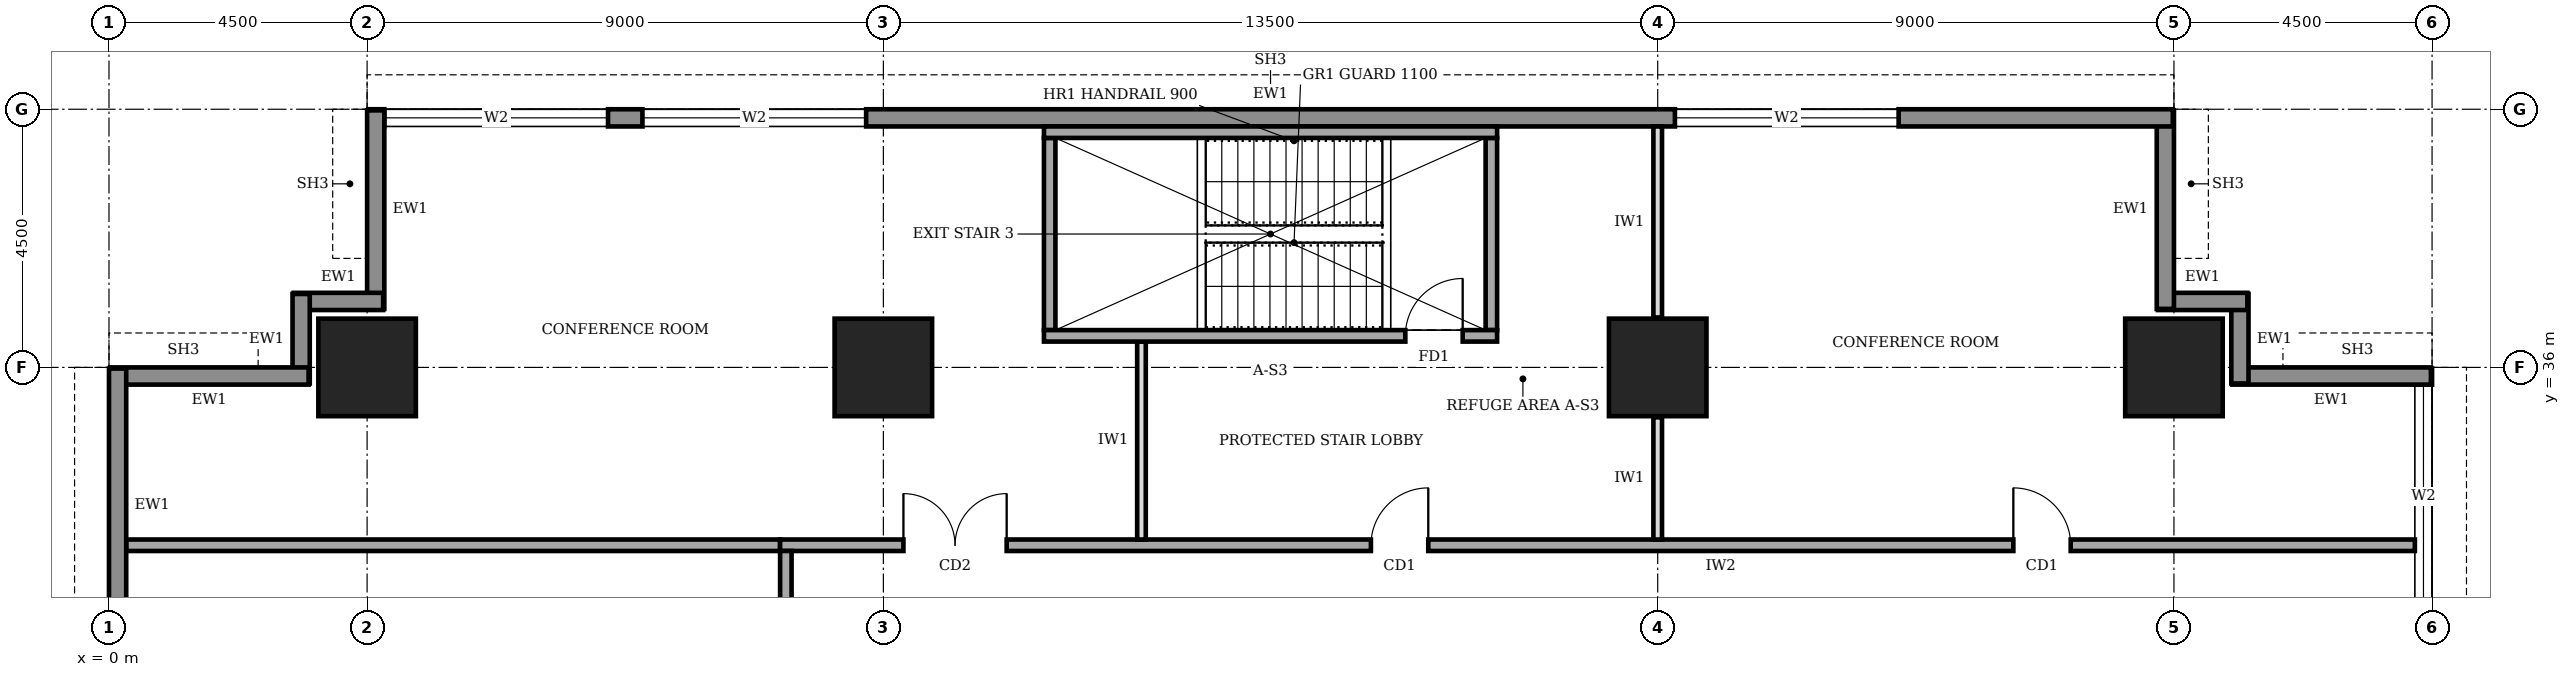
"""IFC4 building model, lengths in metres.
Left out: names, types, materials, properties, quantities, classifications, styles, units other than length and angle.
Written with IfcOpenShell. Run it as: python <this file> out.ifc"""

import sys

from ifc_helpers import new_model, si_unit, direction, frame, frame_2d, origin, origin_2d, place, context, subcontext, project, spatial, rectangle, extrude, element, fill, save


model = new_model("IFC4")
c1 = context("Model", 3, precision=1e-05, world=origin(), true_north=direction((0.0, 1.0)))
c2 = subcontext(c1, "Body", "Model", "MODEL_VIEW")
j1 = project(units=[si_unit("LENGTHUNIT", "METRE"), si_unit("PLANEANGLEUNIT", "RADIAN")], contexts=[c1])
p1 = place(None, origin())
s1 = spatial("IfcSite", under=j1, at=p1, CompositionType="ELEMENT")
p2 = place(p1, origin())
s2 = spatial("IfcBuilding", under=s1, at=p2, CompositionType="ELEMENT")
p3 = place(p2, frame((0.0, 0.0, 149.0)))
s3 = spatial("IfcBuildingStorey", under=s2, at=p3, CompositionType="ELEMENT", Elevation=149.0)
for number, where, z_axis, x_axis in (
    (1, (4.5, 36.0, 0.0), (0.0, 0.0, 1.0), (1.0, 0.0, 0.0)),
    (2, (13.5, 36.0, 0.0), (0.0, 0.0, 1.0), (1.0, 0.0, 0.0)),
    (3, (27.0, 36.0, 0.0), (0.0, 0.0, 1.0), (1.0, 0.0, 0.0)),
    (4, (36.0, 36.0, 0.0), (0.0, 0.0, 1.0), (1.0, 0.0, 0.0)),
):
    element("IfcColumn", number, at=place(p3, frame(where, z_axis=z_axis, x_axis=x_axis)), inside=s3, PredefinedType="COLUMN", context=c2, shape_type="SweptSolid", body=[
        extrude(rectangle(XDim=1.7, YDim=1.7, at=origin_2d()), origin(), (0.0, 0.0, 1.0), 4.0),
    ])
p4 = place(p3, frame((40.35, 4.52, 0.0), z_axis=(0.0, 0.0, 1.0), x_axis=(0.0, 1.0, 0.0)))
e5 = element("IfcWall", 5, at=p4, inside=s3, PredefinedType="STANDARD", context=c2, shape_type="SweptSolid", body=[
    extrude(rectangle(XDim=31.46, YDim=0.3, at=frame_2d((15.73, 0.0))), origin(), (0.0, 0.0, 1.0), 3.75),
])
p5 = place(p4, frame((4.78, 0.0, 0.6)))
e6 = element("IfcOpeningElement", 6, at=p5, cuts=e5, PredefinedType="OPENING", context=c2, shape_type="SweptSolid", body=[
    extrude(rectangle(XDim=3.9, YDim=2.6, at=frame_2d((1.95, 1.3))), frame((0.0, 0.16, 0.0), z_axis=(0.0, -1.0, 0.0), x_axis=(1.0, 0.0, 0.0)), (0.0, 0.0, 1.0), 0.32),
])
p6 = place(p4, frame((9.28, 0.0, 0.6)))
e7 = element("IfcOpeningElement", 7, at=p6, cuts=e5, PredefinedType="OPENING", context=c2, shape_type="SweptSolid", body=[
    extrude(rectangle(XDim=3.9, YDim=2.6, at=frame_2d((1.95, 1.3))), frame((0.0, 0.16, 0.0), z_axis=(0.0, -1.0, 0.0), x_axis=(1.0, 0.0, 0.0)), (0.0, 0.0, 1.0), 0.32),
])
p7 = place(p4, frame((13.78, 0.0, 0.6)))
e8 = element("IfcOpeningElement", 8, at=p7, cuts=e5, PredefinedType="OPENING", context=c2, shape_type="SweptSolid", body=[
    extrude(rectangle(XDim=3.9, YDim=2.6, at=frame_2d((1.95, 1.3))), frame((0.0, 0.16, 0.0), z_axis=(0.0, -1.0, 0.0), x_axis=(1.0, 0.0, 0.0)), (0.0, 0.0, 1.0), 0.32),
])
p8 = place(p4, frame((18.28, 0.0, 0.6)))
e9 = element("IfcOpeningElement", 9, at=p8, cuts=e5, PredefinedType="OPENING", context=c2, shape_type="SweptSolid", body=[
    extrude(rectangle(XDim=3.9, YDim=2.6, at=frame_2d((1.95, 1.3))), frame((0.0, 0.16, 0.0), z_axis=(0.0, -1.0, 0.0), x_axis=(1.0, 0.0, 0.0)), (0.0, 0.0, 1.0), 0.32),
])
p9 = place(p4, frame((22.78, 0.0, 0.6)))
e10 = element("IfcOpeningElement", 10, at=p9, cuts=e5, PredefinedType="OPENING", context=c2, shape_type="SweptSolid", body=[
    extrude(rectangle(XDim=3.9, YDim=2.6, at=frame_2d((1.95, 1.3))), frame((0.0, 0.16, 0.0), z_axis=(0.0, -1.0, 0.0), x_axis=(1.0, 0.0, 0.0)), (0.0, 0.0, 1.0), 0.32),
])
p10 = place(p4, frame((27.28, 0.0, 0.6)))
e11 = element("IfcOpeningElement", 11, at=p10, cuts=e5, PredefinedType="OPENING", context=c2, shape_type="SweptSolid", body=[
    extrude(rectangle(XDim=3.9, YDim=2.6, at=frame_2d((1.95, 1.3))), frame((0.0, 0.16, 0.0), z_axis=(0.0, -1.0, 0.0), x_axis=(1.0, 0.0, 0.0)), (0.0, 0.0, 1.0), 0.32),
])
p11 = place(p3, frame((40.48, 35.85, 0.0), z_axis=(0.0, 0.0, 1.0), x_axis=(-1.0, 0.0, 0.0)))
e12 = element("IfcWall", 12, at=p11, inside=s3, PredefinedType="STANDARD", context=c2, shape_type="SweptSolid", body=[
    extrude(rectangle(XDim=3.46, YDim=0.3, at=frame_2d((1.73, 0.0))), origin(), (0.0, 0.0, 1.0), 2.85),
])
for number, where, z_axis, x_axis in (
    (13, (37.15, 35.72, 0.0), (0.0, 0.0, 1.0), (0.0, 1.0, 0.0)),
    (14, (37.28, 37.15, 0.0), (0.0, 0.0, 1.0), (-1.0, 0.0, 0.0)),
):
    element("IfcWall", number, at=place(p3, frame(where, z_axis=z_axis, x_axis=x_axis)), inside=s3, PredefinedType="STANDARD", context=c2, shape_type="SweptSolid", body=[
        extrude(rectangle(XDim=1.56, YDim=0.3, at=frame_2d((0.78, 0.0))), origin(), (0.0, 0.0, 1.0), 3.75),
    ])
p12 = place(p3, frame((35.85, 37.02, 0.0), z_axis=(0.0, 0.0, 1.0), x_axis=(0.0, 1.0, 0.0)))
e15 = element("IfcWall", 15, at=p12, inside=s3, PredefinedType="STANDARD", context=c2, shape_type="SweptSolid", body=[
    extrude(rectangle(XDim=3.46, YDim=0.3, at=frame_2d((1.73, 0.0))), origin(), (0.0, 0.0, 1.0), 2.85),
])
p13 = place(p3, frame((35.98, 40.35, 0.0), z_axis=(0.0, 0.0, 1.0), x_axis=(-1.0, 0.0, 0.0)))
e16 = element("IfcWall", 16, at=p13, inside=s3, PredefinedType="STANDARD", context=c2, shape_type="SweptSolid", body=[
    extrude(rectangle(XDim=31.46, YDim=0.3, at=frame_2d((15.73, 0.0))), origin(), (0.0, 0.0, 1.0), 3.75),
])
p14 = place(p13, frame((27.28, 0.0, 0.6)))
e17 = element("IfcOpeningElement", 17, at=p14, cuts=e16, PredefinedType="OPENING", context=c2, shape_type="SweptSolid", body=[
    extrude(rectangle(XDim=3.9, YDim=2.6, at=frame_2d((1.95, 1.3))), frame((0.0, 0.16, 0.0), z_axis=(0.0, -1.0, 0.0), x_axis=(1.0, 0.0, 0.0)), (0.0, 0.0, 1.0), 0.32),
])
p15 = place(p13, frame((22.78, 0.0, 0.6)))
e18 = element("IfcOpeningElement", 18, at=p15, cuts=e16, PredefinedType="OPENING", context=c2, shape_type="SweptSolid", body=[
    extrude(rectangle(XDim=3.9, YDim=2.6, at=frame_2d((1.95, 1.3))), frame((0.0, 0.16, 0.0), z_axis=(0.0, -1.0, 0.0), x_axis=(1.0, 0.0, 0.0)), (0.0, 0.0, 1.0), 0.32),
])
p16 = place(p13, frame((4.78, 0.0, 0.6)))
e19 = element("IfcOpeningElement", 19, at=p16, cuts=e16, PredefinedType="OPENING", context=c2, shape_type="SweptSolid", body=[
    extrude(rectangle(XDim=3.9, YDim=2.6, at=frame_2d((1.95, 1.3))), frame((0.0, 0.16, 0.0), z_axis=(0.0, -1.0, 0.0), x_axis=(1.0, 0.0, 0.0)), (0.0, 0.0, 1.0), 0.32),
])
p17 = place(p3, frame((4.65, 40.48, 0.0), z_axis=(0.0, 0.0, 1.0), x_axis=(0.0, -1.0, 0.0)))
e20 = element("IfcWall", 20, at=p17, inside=s3, PredefinedType="STANDARD", context=c2, shape_type="SweptSolid", body=[
    extrude(rectangle(XDim=3.46, YDim=0.3, at=frame_2d((1.73, 0.0))), origin(), (0.0, 0.0, 1.0), 2.85),
])
for number, where, z_axis, x_axis in (
    (21, (4.78, 37.15, 0.0), (0.0, 0.0, 1.0), (-1.0, 0.0, 0.0)),
    (22, (3.35, 37.28, 0.0), (0.0, 0.0, 1.0), (0.0, -1.0, 0.0)),
):
    element("IfcWall", number, at=place(p3, frame(where, z_axis=z_axis, x_axis=x_axis)), inside=s3, PredefinedType="STANDARD", context=c2, shape_type="SweptSolid", body=[
        extrude(rectangle(XDim=1.56, YDim=0.3, at=frame_2d((0.78, 0.0))), origin(), (0.0, 0.0, 1.0), 3.75),
    ])
p18 = place(p3, frame((3.48, 35.85, 0.0), z_axis=(0.0, 0.0, 1.0), x_axis=(-1.0, 0.0, 0.0)))
e23 = element("IfcWall", 23, at=p18, inside=s3, PredefinedType="STANDARD", context=c2, shape_type="SweptSolid", body=[
    extrude(rectangle(XDim=3.46, YDim=0.3, at=frame_2d((1.73, 0.0))), origin(), (0.0, 0.0, 1.0), 2.85),
])
p19 = place(p3, frame((0.15, 35.98, 0.0), z_axis=(0.0, 0.0, 1.0), x_axis=(0.0, -1.0, 0.0)))
e24 = element("IfcWall", 24, at=p19, inside=s3, PredefinedType="STANDARD", context=c2, shape_type="SweptSolid", body=[
    extrude(rectangle(XDim=31.46, YDim=0.3, at=frame_2d((15.73, 0.0))), origin(), (0.0, 0.0, 1.0), 3.75),
])
p20 = place(p19, frame((27.28, 0.0, 0.6)))
e25 = element("IfcOpeningElement", 25, at=p20, cuts=e24, PredefinedType="OPENING", context=c2, shape_type="SweptSolid", body=[
    extrude(rectangle(XDim=3.9, YDim=2.6, at=frame_2d((1.95, 1.3))), frame((0.0, 0.16, 0.0), z_axis=(0.0, -1.0, 0.0), x_axis=(1.0, 0.0, 0.0)), (0.0, 0.0, 1.0), 0.32),
])
p21 = place(p19, frame((22.78, 0.0, 0.6)))
e26 = element("IfcOpeningElement", 26, at=p21, cuts=e24, PredefinedType="OPENING", context=c2, shape_type="SweptSolid", body=[
    extrude(rectangle(XDim=3.9, YDim=2.6, at=frame_2d((1.95, 1.3))), frame((0.0, 0.16, 0.0), z_axis=(0.0, -1.0, 0.0), x_axis=(1.0, 0.0, 0.0)), (0.0, 0.0, 1.0), 0.32),
])
p22 = place(p19, frame((18.28, 0.0, 0.6)))
e27 = element("IfcOpeningElement", 27, at=p22, cuts=e24, PredefinedType="OPENING", context=c2, shape_type="SweptSolid", body=[
    extrude(rectangle(XDim=3.9, YDim=2.6, at=frame_2d((1.95, 1.3))), frame((0.0, 0.16, 0.0), z_axis=(0.0, -1.0, 0.0), x_axis=(1.0, 0.0, 0.0)), (0.0, 0.0, 1.0), 0.32),
])
p23 = place(p19, frame((13.78, 0.0, 0.6)))
e28 = element("IfcOpeningElement", 28, at=p23, cuts=e24, PredefinedType="OPENING", context=c2, shape_type="SweptSolid", body=[
    extrude(rectangle(XDim=3.9, YDim=2.6, at=frame_2d((1.95, 1.3))), frame((0.0, 0.16, 0.0), z_axis=(0.0, -1.0, 0.0), x_axis=(1.0, 0.0, 0.0)), (0.0, 0.0, 1.0), 0.32),
])
p24 = place(p19, frame((9.28, 0.0, 0.6)))
e29 = element("IfcOpeningElement", 29, at=p24, cuts=e24, PredefinedType="OPENING", context=c2, shape_type="SweptSolid", body=[
    extrude(rectangle(XDim=3.9, YDim=2.6, at=frame_2d((1.95, 1.3))), frame((0.0, 0.16, 0.0), z_axis=(0.0, -1.0, 0.0), x_axis=(1.0, 0.0, 0.0)), (0.0, 0.0, 1.0), 0.32),
])
p25 = place(p19, frame((4.78, 0.0, 0.6)))
e30 = element("IfcOpeningElement", 30, at=p25, cuts=e24, PredefinedType="OPENING", context=c2, shape_type="SweptSolid", body=[
    extrude(rectangle(XDim=3.9, YDim=2.6, at=frame_2d((1.95, 1.3))), frame((0.0, 0.16, 0.0), z_axis=(0.0, -1.0, 0.0), x_axis=(1.0, 0.0, 0.0)), (0.0, 0.0, 1.0), 0.32),
])
p26 = place(p3, frame((40.2, 32.9, 0.0), z_axis=(0.0, 0.0, 1.0), x_axis=(-1.0, 0.0, 0.0)))
e31 = element("IfcWall", 31, at=p26, inside=s3, PredefinedType="SOLIDWALL", context=c2, shape_type="SweptSolid", body=[
    extrude(rectangle(XDim=28.5, YDim=0.2, at=frame_2d((14.25, 0.0))), origin(), (0.0, 0.0, 1.0), 3.75),
])
p27 = place(p26, frame((24.55, 0.0, 0.0)))
e32 = element("IfcOpeningElement", 32, at=p27, cuts=e31, PredefinedType="OPENING", context=c2, shape_type="SweptSolid", body=[
    extrude(rectangle(XDim=1.8, YDim=2.1, at=frame_2d((0.9, 1.05))), frame((0.0, 0.11, 0.0), z_axis=(0.0, -1.0, 0.0), x_axis=(1.0, 0.0, 0.0)), (0.0, 0.0, 1.0), 0.22),
])
p28 = place(p26, frame((17.2, 0.0, 0.0)))
e33 = element("IfcOpeningElement", 33, at=p28, cuts=e31, PredefinedType="OPENING", context=c2, shape_type="SweptSolid", body=[
    extrude(rectangle(XDim=1.0, YDim=2.1, at=frame_2d((0.5, 1.05))), frame((0.0, 0.11, 0.0), z_axis=(0.0, -1.0, 0.0), x_axis=(1.0, 0.0, 0.0)), (0.0, 0.0, 1.0), 0.22),
])
p29 = place(p26, frame((6.0, 0.0, 0.0)))
e34 = element("IfcOpeningElement", 34, at=p29, cuts=e31, PredefinedType="OPENING", context=c2, shape_type="SweptSolid", body=[
    extrude(rectangle(XDim=1.0, YDim=2.1, at=frame_2d((0.5, 1.05))), frame((0.0, 0.11, 0.0), z_axis=(0.0, -1.0, 0.0), x_axis=(1.0, 0.0, 0.0)), (0.0, 0.0, 1.0), 0.22),
])
p30 = place(p3, frame((11.8, 32.8, 0.0), z_axis=(0.0, 0.0, 1.0), x_axis=(0.0, -1.0, 0.0)))
e35 = element("IfcWall", 35, at=p30, inside=s3, PredefinedType="SOLIDWALL", context=c2, shape_type="SweptSolid", body=[
    extrude(rectangle(XDim=25.3, YDim=0.2, at=frame_2d((12.65, 0.0))), origin(), (0.0, 0.0, 1.0), 3.75),
])
p31 = place(p30, frame((21.8, 0.0, 0.0)))
e36 = element("IfcOpeningElement", 36, at=p31, cuts=e35, PredefinedType="OPENING", context=c2, shape_type="SweptSolid", body=[
    extrude(rectangle(XDim=1.0, YDim=2.1, at=frame_2d((0.5, 1.05))), frame((0.0, 0.11, 0.0), z_axis=(0.0, -1.0, 0.0), x_axis=(1.0, 0.0, 0.0)), (0.0, 0.0, 1.0), 0.22),
])
p32 = place(p30, frame((17.15, 0.0, 0.0)))
e37 = element("IfcOpeningElement", 37, at=p32, cuts=e35, PredefinedType="OPENING", context=c2, shape_type="SweptSolid", body=[
    extrude(rectangle(XDim=0.9, YDim=2.1, at=frame_2d((0.45, 1.05))), frame((0.0, 0.11, 0.0), z_axis=(0.0, -1.0, 0.0), x_axis=(1.0, 0.0, 0.0)), (0.0, 0.0, 1.0), 0.22),
])
p33 = place(p30, frame((12.35, 0.0, 0.0)))
e38 = element("IfcOpeningElement", 38, at=p33, cuts=e35, PredefinedType="OPENING", context=c2, shape_type="SweptSolid", body=[
    extrude(rectangle(XDim=0.9, YDim=2.1, at=frame_2d((0.45, 1.05))), frame((0.0, 0.11, 0.0), z_axis=(0.0, -1.0, 0.0), x_axis=(1.0, 0.0, 0.0)), (0.0, 0.0, 1.0), 0.22),
])
p34 = place(p30, frame((9.3, 0.0, 0.0)))
e39 = element("IfcOpeningElement", 39, at=p34, cuts=e35, PredefinedType="OPENING", context=c2, shape_type="SweptSolid", body=[
    extrude(rectangle(XDim=0.9, YDim=2.1, at=frame_2d((0.45, 1.05))), frame((0.0, 0.11, 0.0), z_axis=(0.0, -1.0, 0.0), x_axis=(1.0, 0.0, 0.0)), (0.0, 0.0, 1.0), 0.22),
])
p35 = place(p30, frame((6.3, 0.0, 0.0)))
e40 = element("IfcOpeningElement", 40, at=p35, cuts=e35, PredefinedType="OPENING", context=c2, shape_type="SweptSolid", body=[
    extrude(rectangle(XDim=1.0, YDim=2.1, at=frame_2d((0.5, 1.05))), frame((0.0, 0.11, 0.0), z_axis=(0.0, -1.0, 0.0), x_axis=(1.0, 0.0, 0.0)), (0.0, 0.0, 1.0), 0.22),
])
p36 = place(p30, frame((14.4, 0.0, 0.0)))
e41 = element("IfcOpeningElement", 41, at=p36, cuts=e35, PredefinedType="OPENING", context=c2, shape_type="SweptSolid", body=[
    extrude(rectangle(XDim=1.0, YDim=2.1, at=frame_2d((0.5, 1.05))), frame((0.0, 0.11, 0.0), z_axis=(0.0, -1.0, 0.0), x_axis=(1.0, 0.0, 0.0)), (0.0, 0.0, 1.0), 0.22),
])
p37 = place(p30, frame((2.3, 0.0, 0.0)))
e42 = element("IfcOpeningElement", 42, at=p37, cuts=e35, PredefinedType="OPENING", context=c2, shape_type="SweptSolid", body=[
    extrude(rectangle(XDim=1.0, YDim=2.1, at=frame_2d((0.5, 1.05))), frame((0.0, 0.11, 0.0), z_axis=(0.0, -1.0, 0.0), x_axis=(1.0, 0.0, 0.0)), (0.0, 0.0, 1.0), 0.22),
])
p38 = place(p3, frame((0.3, 32.9, 0.0), z_axis=(0.0, 0.0, 1.0), x_axis=(1.0, 0.0, 0.0)))
e43 = element("IfcWall", 43, at=p38, inside=s3, PredefinedType="SOLIDWALL", context=c2, shape_type="SweptSolid", body=[
    extrude(rectangle(XDim=11.4, YDim=0.2, at=frame_2d((5.7, 0.0))), origin(), (0.0, 0.0, 1.0), 3.75),
])
p39 = place(p3, frame((18.0, 33.0, 0.0), z_axis=(0.0, 0.0, 1.0), x_axis=(0.0, 1.0, 0.0)))
e44 = element("IfcWall", 44, at=p39, inside=s3, PredefinedType="PARTITIONING", context=c2, shape_type="SweptSolid", body=[
    extrude(rectangle(XDim=3.45, YDim=0.15, at=frame_2d((1.725, 0.0))), origin(), (0.0, 0.0, 1.0), 3.75),
])
p40 = place(p3, frame((27.0, 33.0, 0.0), z_axis=(0.0, 0.0, 1.0), x_axis=(0.0, 1.0, 0.0)))
e45 = element("IfcWall", 45, at=p40, inside=s3, PredefinedType="PARTITIONING", context=c2, shape_type="SweptSolid", body=[
    extrude(rectangle(XDim=2.13, YDim=0.15, at=frame_2d((1.065, 0.0))), origin(), (0.0, 0.0, 1.0), 2.85),
])
p41 = place(p3, frame((27.0, 36.87, 0.0), z_axis=(0.0, 0.0, 1.0), x_axis=(0.0, 1.0, 0.0)))
e46 = element("IfcWall", 46, at=p41, inside=s3, PredefinedType="PARTITIONING", context=c2, shape_type="SweptSolid", body=[
    extrude(rectangle(XDim=3.33, YDim=0.15, at=frame_2d((1.665, 0.0))), origin(), (0.0, 0.0, 1.0), 2.85),
])
p42 = place(p3, frame((16.3, 36.55, 0.0), z_axis=(0.0, 0.0, 1.0), x_axis=(1.0, 0.0, 0.0)))
e47 = element("IfcWall", 47, at=p42, inside=s3, PredefinedType="SOLIDWALL", context=c2, shape_type="SweptSolid", body=[
    extrude(rectangle(XDim=7.9, YDim=0.2, at=frame_2d((3.95, 0.0))), origin(), (0.0, 0.0, 1.0), 3.75),
])
p43 = place(p42, frame((6.3, 0.0, 0.0)))
e48 = element("IfcOpeningElement", 48, at=p43, cuts=e47, PredefinedType="OPENING", context=c2, shape_type="SweptSolid", body=[
    extrude(rectangle(XDim=1.0, YDim=2.1, at=frame_2d((0.5, 1.05))), frame((0.0, 0.11, 0.0), z_axis=(0.0, -1.0, 0.0), x_axis=(1.0, 0.0, 0.0)), (0.0, 0.0, 1.0), 0.22),
])
p44 = place(p3, frame((16.3, 40.1, 0.0), z_axis=(0.0, 0.0, 1.0), x_axis=(1.0, 0.0, 0.0)))
e49 = element("IfcWall", 49, at=p44, inside=s3, PredefinedType="SOLIDWALL", context=c2, shape_type="SweptSolid", body=[
    extrude(rectangle(XDim=7.9, YDim=0.2, at=frame_2d((3.95, 0.0))), origin(), (0.0, 0.0, 1.0), 3.75),
])
for number, where, z_axis, x_axis in (
    (50, (16.4, 36.65, 0.0), (0.0, 0.0, 1.0), (0.0, 1.0, 0.0)),
    (51, (24.1, 36.65, 0.0), (0.0, 0.0, 1.0), (0.0, 1.0, 0.0)),
):
    element("IfcWall", number, at=place(p3, frame(where, z_axis=z_axis, x_axis=x_axis)), inside=s3, PredefinedType="SOLIDWALL", context=c2, shape_type="SweptSolid", body=[
        extrude(rectangle(XDim=3.35, YDim=0.2, at=frame_2d((1.675, 0.0))), origin(), (0.0, 0.0, 1.0), 3.75),
    ])
p45 = place(p10, origin())
e52 = element("IfcWindow", 52, at=p45, inside=s3, PartitioningType="SINGLE_PANEL", PredefinedType="WINDOW", context=c2, shape_type="SweptSolid", body=[
    extrude(rectangle(XDim=3.9, YDim=2.6, at=frame_2d((1.95, 1.3))), frame((0.0, 0.03, 0.0), z_axis=(0.0, -1.0, 0.0), x_axis=(1.0, 0.0, 0.0)), (0.0, 0.0, 1.0), 0.06),
])
fill(e11, e52)
p46 = place(p14, origin())
e53 = element("IfcWindow", 53, at=p46, inside=s3, PartitioningType="SINGLE_PANEL", PredefinedType="WINDOW", context=c2, shape_type="SweptSolid", body=[
    extrude(rectangle(XDim=3.9, YDim=2.6, at=frame_2d((1.95, 1.3))), frame((0.0, 0.03, 0.0), z_axis=(0.0, -1.0, 0.0), x_axis=(1.0, 0.0, 0.0)), (0.0, 0.0, 1.0), 0.06),
])
fill(e17, e53)
p47 = place(p15, origin())
e54 = element("IfcWindow", 54, at=p47, inside=s3, PartitioningType="SINGLE_PANEL", PredefinedType="WINDOW", context=c2, shape_type="SweptSolid", body=[
    extrude(rectangle(XDim=3.9, YDim=2.6, at=frame_2d((1.95, 1.3))), frame((0.0, 0.03, 0.0), z_axis=(0.0, -1.0, 0.0), x_axis=(1.0, 0.0, 0.0)), (0.0, 0.0, 1.0), 0.06),
])
fill(e18, e54)
p48 = place(p16, origin())
e55 = element("IfcWindow", 55, at=p48, inside=s3, PartitioningType="SINGLE_PANEL", PredefinedType="WINDOW", context=c2, shape_type="SweptSolid", body=[
    extrude(rectangle(XDim=3.9, YDim=2.6, at=frame_2d((1.95, 1.3))), frame((0.0, 0.03, 0.0), z_axis=(0.0, -1.0, 0.0), x_axis=(1.0, 0.0, 0.0)), (0.0, 0.0, 1.0), 0.06),
])
fill(e19, e55)
p49 = place(p27, frame((1.8, 0.0, 0.0), z_axis=(0.0, 0.0, 1.0), x_axis=(-1.0, 0.0, 0.0)))
e56 = element("IfcDoor", 56, at=p49, inside=s3, OperationType="DOUBLE_DOOR_SINGLE_SWING", PredefinedType="DOOR", context=c2, shape_type="SweptSolid", body=[
    extrude(rectangle(XDim=1.8, YDim=2.1, at=frame_2d((0.9, 1.05))), frame((0.0, 0.025, 0.0), z_axis=(0.0, -1.0, 0.0), x_axis=(1.0, 0.0, 0.0)), (0.0, 0.0, 1.0), 0.05),
])
fill(e32, e56)
p50 = place(p28, frame((1.0, 0.0, 0.0), z_axis=(0.0, 0.0, 1.0), x_axis=(-1.0, 0.0, 0.0)))
e57 = element("IfcDoor", 57, at=p50, inside=s3, OperationType="SINGLE_SWING_RIGHT", PredefinedType="DOOR", context=c2, shape_type="SweptSolid", body=[
    extrude(rectangle(XDim=1.0, YDim=2.1, at=frame_2d((0.5, 1.05))), frame((0.0, 0.025, 0.0), z_axis=(0.0, -1.0, 0.0), x_axis=(1.0, 0.0, 0.0)), (0.0, 0.0, 1.0), 0.05),
])
fill(e33, e57)
p51 = place(p29, frame((1.0, 0.0, 0.0), z_axis=(0.0, 0.0, 1.0), x_axis=(-1.0, 0.0, 0.0)))
e58 = element("IfcDoor", 58, at=p51, inside=s3, OperationType="SINGLE_SWING_LEFT", PredefinedType="DOOR", context=c2, shape_type="SweptSolid", body=[
    extrude(rectangle(XDim=1.0, YDim=2.1, at=frame_2d((0.5, 1.05))), frame((0.0, 0.025, 0.0), z_axis=(0.0, -1.0, 0.0), x_axis=(1.0, 0.0, 0.0)), (0.0, 0.0, 1.0), 0.05),
])
fill(e34, e58)
p52 = place(p43, origin())
e59 = element("IfcDoor", 59, at=p52, inside=s3, OperationType="SINGLE_SWING_RIGHT", PredefinedType="DOOR", context=c2, shape_type="SweptSolid", body=[
    extrude(rectangle(XDim=1.0, YDim=2.1, at=frame_2d((0.5, 1.05))), frame((0.0, 0.025, 0.0), z_axis=(0.0, -1.0, 0.0), x_axis=(1.0, 0.0, 0.0)), (0.0, 0.0, 1.0), 0.05),
])
fill(e48, e59)
save(model, sys.argv[1])
